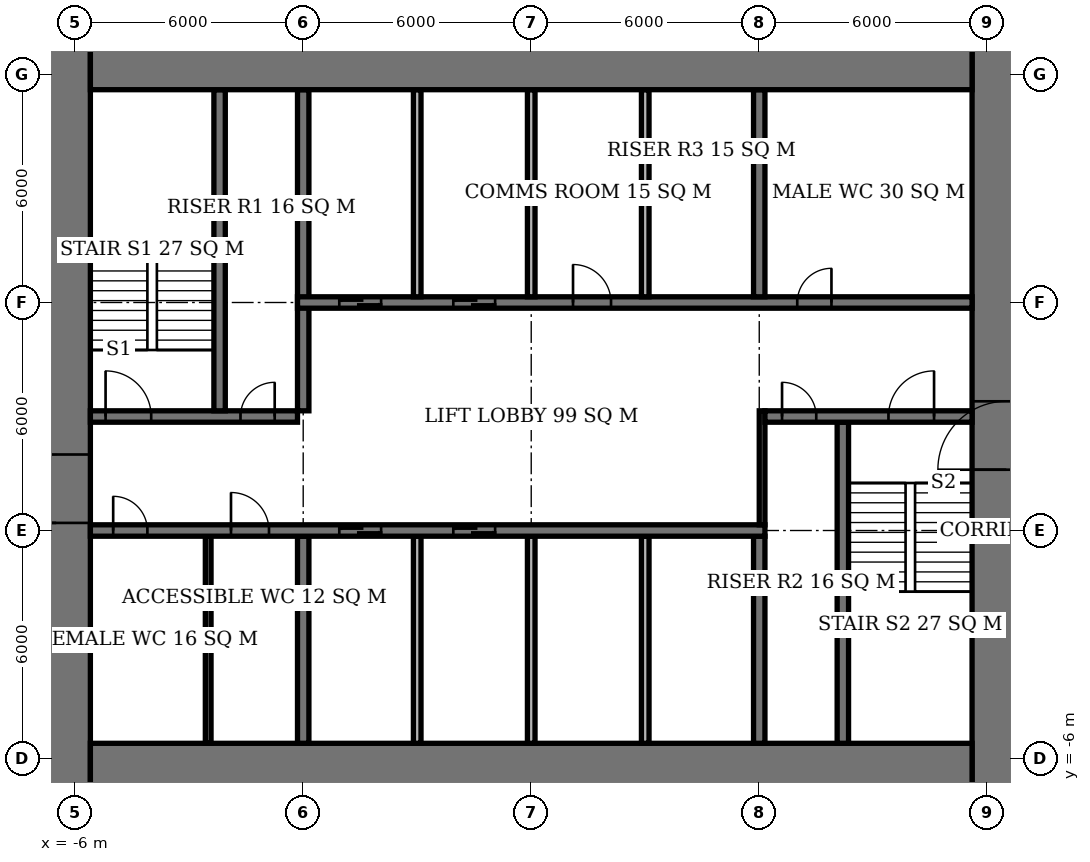
"""IFC4 building model, lengths in metres.
Left out: names, types, materials, properties, quantities, classifications, styles, units other than length and angle.
Written with IfcOpenShell. Run it as: python <this file> out.ifc"""

import sys

from ifc_helpers import new_model, si_unit, direction, frame, frame_2d, origin, place, context, subcontext, project, spatial, rectangle, extrude, element, fill, save


model = new_model("IFC4")
c1 = context("Model", 3, precision=1e-05, world=origin(), true_north=direction((0.0, 1.0)))
c2 = subcontext(c1, "Body", "Model", "MODEL_VIEW")
j1 = project(units=[si_unit("LENGTHUNIT", "METRE"), si_unit("PLANEANGLEUNIT", "RADIAN")], contexts=[c1])
p1 = place(None, origin())
s1 = spatial("IfcSite", under=j1, at=p1, CompositionType="ELEMENT")
p2 = place(p1, origin())
s2 = spatial("IfcBuilding", under=s1, at=p2, CompositionType="ELEMENT")
p3 = place(p2, frame((0.0, 0.0, 93.8)))
s3 = spatial("IfcBuildingStorey", under=s2, at=p3, CompositionType="ELEMENT", Elevation=93.8)
for number, where, z_axis, x_axis in (
    (1, (-5.6, -6.6, 0.0), (0.0, 0.0, 1.0), (1.0, 0.0, 0.0)),
    (2, (-5.6, 12.6, 0.0), (0.0, 0.0, 1.0), (1.0, 0.0, 0.0)),
):
    element("IfcWall", number, at=place(p3, frame(where, z_axis=z_axis, x_axis=x_axis)), inside=s3, PredefinedType="SHEAR", context=c2, shape_type="SweptSolid", body=[
        extrude(rectangle(XDim=23.2, YDim=2.0, at=frame_2d((11.6, 0.0))), origin(), (0.0, 0.0, 1.0), 3.9),
    ])
p4 = place(p3, frame((-6.5, -7.6, 0.0), z_axis=(0.0, 0.0, 1.0), x_axis=(0.0, 1.0, 0.0)))
e3 = element("IfcWall", 3, at=p4, inside=s3, PredefinedType="SHEAR", context=c2, shape_type="SweptSolid", body=[
    extrude(rectangle(XDim=21.2, YDim=1.8, at=frame_2d((10.6, 0.0))), origin(), (0.0, 0.0, 1.0), 3.9),
])
p5 = place(p4, frame((7.8, 0.0, 0.0)))
e4 = element("IfcOpeningElement", 4, at=p5, cuts=e3, PredefinedType="OPENING", context=c2, shape_type="SweptSolid", body=[
    extrude(rectangle(XDim=1.8, YDim=2.4, at=frame_2d((0.9, 1.2))), frame((0.0, 0.91, 0.0), z_axis=(0.0, -1.0, 0.0), x_axis=(1.0, 0.0, 0.0)), (0.0, 0.0, 1.0), 1.82),
])
p6 = place(p3, frame((18.5, -7.6, 0.0), z_axis=(0.0, 0.0, 1.0), x_axis=(0.0, 1.0, 0.0)))
e5 = element("IfcWall", 5, at=p6, inside=s3, PredefinedType="SHEAR", context=c2, shape_type="SweptSolid", body=[
    extrude(rectangle(XDim=21.2, YDim=1.8, at=frame_2d((10.6, 0.0))), origin(), (0.0, 0.0, 1.0), 3.9),
])
p7 = place(p6, frame((9.2, 0.0, 0.0)))
e6 = element("IfcOpeningElement", 6, at=p7, cuts=e5, PredefinedType="OPENING", context=c2, shape_type="SweptSolid", body=[
    extrude(rectangle(XDim=1.8, YDim=2.4, at=frame_2d((0.9, 1.2))), frame((0.0, 0.91, 0.0), z_axis=(0.0, -1.0, 0.0), x_axis=(1.0, 0.0, 0.0)), (0.0, 0.0, 1.0), 1.82),
])
p8 = place(p3, frame((-5.6, 0.0, 0.0), z_axis=(0.0, 0.0, 1.0), x_axis=(1.0, 0.0, 0.0)))
e7 = element("IfcWall", 7, at=p8, inside=s3, PredefinedType="SHEAR", context=c2, shape_type="SweptSolid", body=[
    extrude(rectangle(XDim=17.75, YDim=0.3, at=frame_2d((8.875, 0.0))), origin(), (0.0, 0.0, 1.0), 3.9),
])
p9 = place(p8, frame((0.6, 0.0, 0.0)))
e8 = element("IfcOpeningElement", 8, at=p9, cuts=e7, PredefinedType="OPENING", context=c2, shape_type="SweptSolid", body=[
    extrude(rectangle(XDim=0.9, YDim=2.1, at=frame_2d((0.45, 1.05))), frame((0.0, 0.16, 0.0), z_axis=(0.0, -1.0, 0.0), x_axis=(1.0, 0.0, 0.0)), (0.0, 0.0, 1.0), 0.32),
])
p10 = place(p8, frame((3.7, 0.0, 0.0)))
e9 = element("IfcOpeningElement", 9, at=p10, cuts=e7, PredefinedType="OPENING", context=c2, shape_type="SweptSolid", body=[
    extrude(rectangle(XDim=1.0, YDim=2.1, at=frame_2d((0.5, 1.05))), frame((0.0, 0.16, 0.0), z_axis=(0.0, -1.0, 0.0), x_axis=(1.0, 0.0, 0.0)), (0.0, 0.0, 1.0), 0.32),
])
p11 = place(p8, frame((6.55, 0.0, 0.0)))
e10 = element("IfcOpeningElement", 10, at=p11, cuts=e7, PredefinedType="OPENING", context=c2, shape_type="SweptSolid", body=[
    extrude(rectangle(XDim=1.1, YDim=2.1, at=frame_2d((0.55, 1.05))), frame((0.0, 0.16, 0.0), z_axis=(0.0, -1.0, 0.0), x_axis=(1.0, 0.0, 0.0)), (0.0, 0.0, 1.0), 0.32),
])
p12 = place(p8, frame((9.55, 0.0, 0.0)))
e11 = element("IfcOpeningElement", 11, at=p12, cuts=e7, PredefinedType="OPENING", context=c2, shape_type="SweptSolid", body=[
    extrude(rectangle(XDim=1.1, YDim=2.1, at=frame_2d((0.55, 1.05))), frame((0.0, 0.16, 0.0), z_axis=(0.0, -1.0, 0.0), x_axis=(1.0, 0.0, 0.0)), (0.0, 0.0, 1.0), 0.32),
])
p13 = place(p3, frame((-5.6, 3.0, 0.0), z_axis=(0.0, 0.0, 1.0), x_axis=(1.0, 0.0, 0.0)))
e12 = element("IfcWall", 12, at=p13, inside=s3, PredefinedType="SHEAR", context=c2, shape_type="SweptSolid", body=[
    extrude(rectangle(XDim=5.45, YDim=0.3, at=frame_2d((2.725, 0.0))), origin(), (0.0, 0.0, 1.0), 3.9),
])
p14 = place(p13, frame((0.4, 0.0, 0.0)))
e13 = element("IfcOpeningElement", 13, at=p14, cuts=e12, PredefinedType="OPENING", context=c2, shape_type="SweptSolid", body=[
    extrude(rectangle(XDim=1.2, YDim=2.1, at=frame_2d((0.6, 1.05))), frame((0.0, 0.16, 0.0), z_axis=(0.0, -1.0, 0.0), x_axis=(1.0, 0.0, 0.0)), (0.0, 0.0, 1.0), 0.32),
])
p15 = place(p13, frame((3.95, 0.0, 0.0)))
e14 = element("IfcOpeningElement", 14, at=p15, cuts=e12, PredefinedType="OPENING", context=c2, shape_type="SweptSolid", body=[
    extrude(rectangle(XDim=0.9, YDim=2.1, at=frame_2d((0.45, 1.05))), frame((0.0, 0.16, 0.0), z_axis=(0.0, -1.0, 0.0), x_axis=(1.0, 0.0, 0.0)), (0.0, 0.0, 1.0), 0.32),
])
p16 = place(p3, frame((12.15, 3.0, 0.0), z_axis=(0.0, 0.0, 1.0), x_axis=(1.0, 0.0, 0.0)))
e15 = element("IfcWall", 15, at=p16, inside=s3, PredefinedType="SHEAR", context=c2, shape_type="SweptSolid", body=[
    extrude(rectangle(XDim=5.45, YDim=0.3, at=frame_2d((2.725, 0.0))), origin(), (0.0, 0.0, 1.0), 3.9),
])
p17 = place(p16, frame((3.25, 0.0, 0.0)))
e16 = element("IfcOpeningElement", 16, at=p17, cuts=e15, PredefinedType="OPENING", context=c2, shape_type="SweptSolid", body=[
    extrude(rectangle(XDim=1.2, YDim=2.1, at=frame_2d((0.6, 1.05))), frame((0.0, 0.16, 0.0), z_axis=(0.0, -1.0, 0.0), x_axis=(1.0, 0.0, 0.0)), (0.0, 0.0, 1.0), 0.32),
])
p18 = place(p16, frame((0.45, 0.0, 0.0)))
e17 = element("IfcOpeningElement", 17, at=p18, cuts=e15, PredefinedType="OPENING", context=c2, shape_type="SweptSolid", body=[
    extrude(rectangle(XDim=0.9, YDim=2.1, at=frame_2d((0.45, 1.05))), frame((0.0, 0.16, 0.0), z_axis=(0.0, -1.0, 0.0), x_axis=(1.0, 0.0, 0.0)), (0.0, 0.0, 1.0), 0.32),
])
p19 = place(p3, frame((-0.15, 6.0, 0.0), z_axis=(0.0, 0.0, 1.0), x_axis=(1.0, 0.0, 0.0)))
e18 = element("IfcWall", 18, at=p19, inside=s3, PredefinedType="SHEAR", context=c2, shape_type="SweptSolid", body=[
    extrude(rectangle(XDim=17.75, YDim=0.3, at=frame_2d((8.875, 0.0))), origin(), (0.0, 0.0, 1.0), 3.9),
])
p20 = place(p19, frame((13.15, 0.0, 0.0)))
e19 = element("IfcOpeningElement", 19, at=p20, cuts=e18, PredefinedType="OPENING", context=c2, shape_type="SweptSolid", body=[
    extrude(rectangle(XDim=0.9, YDim=2.1, at=frame_2d((0.45, 1.05))), frame((0.0, 0.16, 0.0), z_axis=(0.0, -1.0, 0.0), x_axis=(1.0, 0.0, 0.0)), (0.0, 0.0, 1.0), 0.32),
])
p21 = place(p19, frame((7.25, 0.0, 0.0)))
e20 = element("IfcOpeningElement", 20, at=p21, cuts=e18, PredefinedType="OPENING", context=c2, shape_type="SweptSolid", body=[
    extrude(rectangle(XDim=1.0, YDim=2.1, at=frame_2d((0.5, 1.05))), frame((0.0, 0.16, 0.0), z_axis=(0.0, -1.0, 0.0), x_axis=(1.0, 0.0, 0.0)), (0.0, 0.0, 1.0), 0.32),
])
p22 = place(p19, frame((1.1, 0.0, 0.0)))
e21 = element("IfcOpeningElement", 21, at=p22, cuts=e18, PredefinedType="OPENING", context=c2, shape_type="SweptSolid", body=[
    extrude(rectangle(XDim=1.1, YDim=2.1, at=frame_2d((0.55, 1.05))), frame((0.0, 0.16, 0.0), z_axis=(0.0, -1.0, 0.0), x_axis=(1.0, 0.0, 0.0)), (0.0, 0.0, 1.0), 0.32),
])
p23 = place(p19, frame((4.1, 0.0, 0.0)))
e22 = element("IfcOpeningElement", 22, at=p23, cuts=e18, PredefinedType="OPENING", context=c2, shape_type="SweptSolid", body=[
    extrude(rectangle(XDim=1.1, YDim=2.1, at=frame_2d((0.55, 1.05))), frame((0.0, 0.16, 0.0), z_axis=(0.0, -1.0, 0.0), x_axis=(1.0, 0.0, 0.0)), (0.0, 0.0, 1.0), 0.32),
])
p24 = place(p3, frame((0.0, -5.6, 0.0), z_axis=(0.0, 0.0, 1.0), x_axis=(0.0, 1.0, 0.0)))
e23 = element("IfcWall", 23, at=p24, inside=s3, PredefinedType="SHEAR", context=c2, shape_type="SweptSolid", body=[
    extrude(rectangle(XDim=5.45, YDim=0.3, at=frame_2d((2.725, 0.0))), origin(), (0.0, 0.0, 1.0), 3.9),
])
p25 = place(p3, frame((0.0, 3.15, 0.0), z_axis=(0.0, 0.0, 1.0), x_axis=(0.0, 1.0, 0.0)))
e24 = element("IfcWall", 24, at=p25, inside=s3, PredefinedType="SHEAR", context=c2, shape_type="SweptSolid", body=[
    extrude(rectangle(XDim=8.45, YDim=0.3, at=frame_2d((4.225, 0.0))), origin(), (0.0, 0.0, 1.0), 3.9),
])
for number, where, z_axis, x_axis in (
    (25, (12.0, -5.6, 0.0), (0.0, 0.0, 1.0), (0.0, 1.0, 0.0)),
    (26, (12.0, 6.15, 0.0), (0.0, 0.0, 1.0), (0.0, 1.0, 0.0)),
):
    element("IfcWall", number, at=place(p3, frame(where, z_axis=z_axis, x_axis=x_axis)), inside=s3, PredefinedType="SHEAR", context=c2, shape_type="SweptSolid", body=[
        extrude(rectangle(XDim=5.45, YDim=0.3, at=frame_2d((2.725, 0.0))), origin(), (0.0, 0.0, 1.0), 3.9),
    ])
for number, where, z_axis, x_axis in (
    (27, (-2.2, 3.15, 0.0), (0.0, 0.0, 1.0), (0.0, 1.0, 0.0)),
    (28, (14.2, -5.6, 0.0), (0.0, 0.0, 1.0), (0.0, 1.0, 0.0)),
):
    element("IfcWall", number, at=place(p3, frame(where, z_axis=z_axis, x_axis=x_axis)), inside=s3, PredefinedType="SHEAR", context=c2, shape_type="SweptSolid", body=[
        extrude(rectangle(XDim=8.45, YDim=0.3, at=frame_2d((4.225, 0.0))), origin(), (0.0, 0.0, 1.0), 3.9),
    ])
for number, where, z_axis, x_axis in (
    (29, (3.0, 6.15, 0.0), (0.0, 0.0, 1.0), (0.0, 1.0, 0.0)),
    (30, (6.0, 6.15, 0.0), (0.0, 0.0, 1.0), (0.0, 1.0, 0.0)),
    (31, (9.0, 6.15, 0.0), (0.0, 0.0, 1.0), (0.0, 1.0, 0.0)),
    (32, (3.0, -5.6, 0.0), (0.0, 0.0, 1.0), (0.0, 1.0, 0.0)),
    (33, (6.0, -5.6, 0.0), (0.0, 0.0, 1.0), (0.0, 1.0, 0.0)),
    (34, (9.0, -5.6, 0.0), (0.0, 0.0, 1.0), (0.0, 1.0, 0.0)),
):
    element("IfcWall", number, at=place(p3, frame(where, z_axis=z_axis, x_axis=x_axis)), inside=s3, PredefinedType="SOLIDWALL", context=c2, shape_type="SweptSolid", body=[
        extrude(rectangle(XDim=5.45, YDim=0.2, at=frame_2d((2.725, 0.0))), origin(), (0.0, 0.0, 1.0), 3.9),
    ])
p26 = place(p3, frame((-2.5, -5.6, 0.0), z_axis=(0.0, 0.0, 1.0), x_axis=(0.0, 1.0, 0.0)))
e35 = element("IfcWall", 35, at=p26, inside=s3, PredefinedType="PLUMBINGWALL", context=c2, shape_type="SweptSolid", body=[
    extrude(rectangle(XDim=5.45, YDim=0.15, at=frame_2d((2.725, 0.0))), origin(), (0.0, 0.0, 1.0), 3.65),
])
p27 = place(p3, frame((12.075, 0.15, 0.0), z_axis=(0.0, 0.0, 1.0), x_axis=(0.0, 1.0, 0.0)))
e36 = element("IfcWall", 36, at=p27, inside=s3, PredefinedType="PARTITIONING", context=c2, shape_type="SweptSolid", body=[
    extrude(rectangle(XDim=3.0, YDim=0.15, at=frame_2d((1.5, 0.0))), origin(), (0.0, 0.0, 1.0), 3.65),
])
p28 = place(p5, origin())
e37 = element("IfcDoor", 37, at=p28, inside=s3, OperationType="DOUBLE_DOOR_SINGLE_SWING", PredefinedType="DOOR", context=c2, shape_type="SweptSolid", body=[
    extrude(rectangle(XDim=1.8, YDim=2.4, at=frame_2d((0.9, 1.2))), frame((0.0, 0.025, 0.0), z_axis=(0.0, -1.0, 0.0), x_axis=(1.0, 0.0, 0.0)), (0.0, 0.0, 1.0), 0.05),
])
fill(e4, e37)
p29 = place(p7, origin())
e38 = element("IfcDoor", 38, at=p29, inside=s3, OperationType="DOUBLE_DOOR_SINGLE_SWING", PredefinedType="DOOR", context=c2, shape_type="SweptSolid", body=[
    extrude(rectangle(XDim=1.8, YDim=2.4, at=frame_2d((0.9, 1.2))), frame((0.0, 0.025, 0.0), z_axis=(0.0, -1.0, 0.0), x_axis=(1.0, 0.0, 0.0)), (0.0, 0.0, 1.0), 0.05),
])
fill(e6, e38)
p30 = place(p14, origin())
e39 = element("IfcDoor", 39, at=p30, inside=s3, OperationType="SINGLE_SWING_LEFT", PredefinedType="DOOR", context=c2, shape_type="SweptSolid", body=[
    extrude(rectangle(XDim=1.2, YDim=2.1, at=frame_2d((0.6, 1.05))), frame((0.0, 0.025, 0.0), z_axis=(0.0, -1.0, 0.0), x_axis=(1.0, 0.0, 0.0)), (0.0, 0.0, 1.0), 0.05),
])
fill(e13, e39)
p31 = place(p15, origin())
e40 = element("IfcDoor", 40, at=p31, inside=s3, OperationType="SINGLE_SWING_RIGHT", PredefinedType="DOOR", context=c2, shape_type="SweptSolid", body=[
    extrude(rectangle(XDim=0.9, YDim=2.1, at=frame_2d((0.45, 1.05))), frame((0.0, 0.025, 0.0), z_axis=(0.0, -1.0, 0.0), x_axis=(1.0, 0.0, 0.0)), (0.0, 0.0, 1.0), 0.05),
])
fill(e14, e40)
p32 = place(p17, origin())
e41 = element("IfcDoor", 41, at=p32, inside=s3, OperationType="SINGLE_SWING_RIGHT", PredefinedType="DOOR", context=c2, shape_type="SweptSolid", body=[
    extrude(rectangle(XDim=1.2, YDim=2.1, at=frame_2d((0.6, 1.05))), frame((0.0, 0.025, 0.0), z_axis=(0.0, -1.0, 0.0), x_axis=(1.0, 0.0, 0.0)), (0.0, 0.0, 1.0), 0.05),
])
fill(e16, e41)
p33 = place(p18, origin())
e42 = element("IfcDoor", 42, at=p33, inside=s3, OperationType="SINGLE_SWING_LEFT", PredefinedType="DOOR", context=c2, shape_type="SweptSolid", body=[
    extrude(rectangle(XDim=0.9, YDim=2.1, at=frame_2d((0.45, 1.05))), frame((0.0, 0.025, 0.0), z_axis=(0.0, -1.0, 0.0), x_axis=(1.0, 0.0, 0.0)), (0.0, 0.0, 1.0), 0.05),
])
fill(e17, e42)
p34 = place(p9, origin())
e43 = element("IfcDoor", 43, at=p34, inside=s3, OperationType="SINGLE_SWING_LEFT", PredefinedType="DOOR", context=c2, shape_type="SweptSolid", body=[
    extrude(rectangle(XDim=0.9, YDim=2.1, at=frame_2d((0.45, 1.05))), frame((0.0, 0.025, 0.0), z_axis=(0.0, -1.0, 0.0), x_axis=(1.0, 0.0, 0.0)), (0.0, 0.0, 1.0), 0.05),
])
fill(e8, e43)
p35 = place(p10, origin())
e44 = element("IfcDoor", 44, at=p35, inside=s3, OperationType="SINGLE_SWING_LEFT", PredefinedType="DOOR", context=c2, shape_type="SweptSolid", body=[
    extrude(rectangle(XDim=1.0, YDim=2.1, at=frame_2d((0.5, 1.05))), frame((0.0, 0.025, 0.0), z_axis=(0.0, -1.0, 0.0), x_axis=(1.0, 0.0, 0.0)), (0.0, 0.0, 1.0), 0.05),
])
fill(e9, e44)
p36 = place(p20, origin())
e45 = element("IfcDoor", 45, at=p36, inside=s3, OperationType="SINGLE_SWING_RIGHT", PredefinedType="DOOR", context=c2, shape_type="SweptSolid", body=[
    extrude(rectangle(XDim=0.9, YDim=2.1, at=frame_2d((0.45, 1.05))), frame((0.0, 0.025, 0.0), z_axis=(0.0, -1.0, 0.0), x_axis=(1.0, 0.0, 0.0)), (0.0, 0.0, 1.0), 0.05),
])
fill(e19, e45)
p37 = place(p21, origin())
e46 = element("IfcDoor", 46, at=p37, inside=s3, OperationType="SINGLE_SWING_LEFT", PredefinedType="DOOR", context=c2, shape_type="SweptSolid", body=[
    extrude(rectangle(XDim=1.0, YDim=2.1, at=frame_2d((0.5, 1.05))), frame((0.0, 0.025, 0.0), z_axis=(0.0, -1.0, 0.0), x_axis=(1.0, 0.0, 0.0)), (0.0, 0.0, 1.0), 0.05),
])
fill(e20, e46)
p38 = place(p22, origin())
e47 = element("IfcDoor", 47, at=p38, inside=s3, OperationType="DOUBLE_DOOR_SLIDING", PredefinedType="USERDEFINED", context=c2, shape_type="SweptSolid", body=[
    extrude(rectangle(XDim=1.1, YDim=2.1, at=frame_2d((0.55, 1.05))), frame((0.0, 0.025, 0.0), z_axis=(0.0, -1.0, 0.0), x_axis=(1.0, 0.0, 0.0)), (0.0, 0.0, 1.0), 0.05),
])
fill(e21, e47)
p39 = place(p23, origin())
e48 = element("IfcDoor", 48, at=p39, inside=s3, OperationType="DOUBLE_DOOR_SLIDING", PredefinedType="USERDEFINED", context=c2, shape_type="SweptSolid", body=[
    extrude(rectangle(XDim=1.1, YDim=2.1, at=frame_2d((0.55, 1.05))), frame((0.0, 0.025, 0.0), z_axis=(0.0, -1.0, 0.0), x_axis=(1.0, 0.0, 0.0)), (0.0, 0.0, 1.0), 0.05),
])
fill(e22, e48)
p40 = place(p11, origin())
e49 = element("IfcDoor", 49, at=p40, inside=s3, OperationType="DOUBLE_DOOR_SLIDING", PredefinedType="USERDEFINED", context=c2, shape_type="SweptSolid", body=[
    extrude(rectangle(XDim=1.1, YDim=2.1, at=frame_2d((0.55, 1.05))), frame((0.0, 0.025, 0.0), z_axis=(0.0, -1.0, 0.0), x_axis=(1.0, 0.0, 0.0)), (0.0, 0.0, 1.0), 0.05),
])
fill(e10, e49)
p41 = place(p12, origin())
e50 = element("IfcDoor", 50, at=p41, inside=s3, OperationType="DOUBLE_DOOR_SLIDING", PredefinedType="USERDEFINED", context=c2, shape_type="SweptSolid", body=[
    extrude(rectangle(XDim=1.1, YDim=2.1, at=frame_2d((0.55, 1.05))), frame((0.0, 0.025, 0.0), z_axis=(0.0, -1.0, 0.0), x_axis=(1.0, 0.0, 0.0)), (0.0, 0.0, 1.0), 0.05),
])
fill(e11, e50)
save(model, sys.argv[1])
